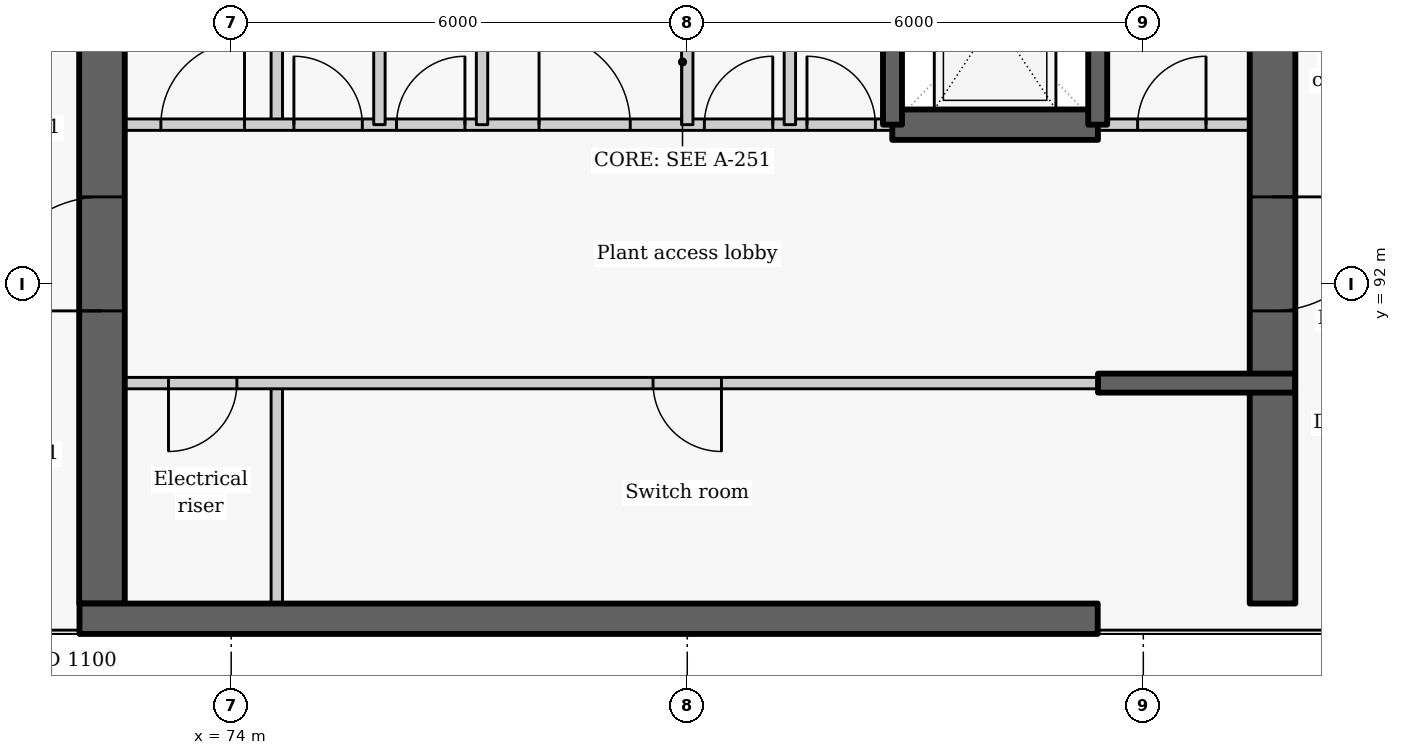
"""IFC4 building model, lengths in metres.
Left out: names, types, materials, properties, quantities, classifications, styles, units other than length and angle.
Written with IfcOpenShell. Run it as: python <this file> out.ifc"""

import sys

from ifc_helpers import new_model, si_unit, direction, frame, frame_2d, origin, place, context, subcontext, project, spatial, rectangle, extrude, element, fill, save


model = new_model("IFC4")
c1 = context("Model", 3, precision=1e-05, world=origin(), true_north=direction((0.0, 1.0)))
c2 = subcontext(c1, "Body", "Model", "MODEL_VIEW")
j1 = project(units=[si_unit("LENGTHUNIT", "METRE"), si_unit("PLANEANGLEUNIT", "RADIAN")], contexts=[c1])
p1 = place(None, origin())
s1 = spatial("IfcSite", under=j1, at=p1, CompositionType="ELEMENT")
p2 = place(p1, origin())
s2 = spatial("IfcBuilding", under=s1, at=p2, CompositionType="ELEMENT")
p3 = place(p2, frame((0.0, 0.0, 294.0)))
s3 = spatial("IfcBuildingStorey", under=s2, at=p3, CompositionType="ELEMENT", Elevation=294.0)
p4 = place(p3, frame((74.6, 87.8, 0.0), z_axis=(0.0, 0.0, 1.0), x_axis=(0.0, 1.0, 0.0)))
e1 = element("IfcWall", 1, at=p4, inside=s3, PredefinedType="PARTITIONING", context=c2, shape_type="SweptSolid", body=[
    extrude(rectangle(XDim=2.9, YDim=0.15, at=frame_2d((1.45, 0.0))), origin(), (0.0, 0.0, 1.0), 3.325),
])
p5 = place(p3, frame((74.6, 94.1, 0.0), z_axis=(0.0, 0.0, 1.0), x_axis=(0.0, 1.0, 0.0)))
e2 = element("IfcWall", 2, at=p5, inside=s3, PredefinedType="PARTITIONING", context=c2, shape_type="SweptSolid", body=[
    extrude(rectangle(XDim=2.8, YDim=0.15, at=frame_2d((1.4, 0.0))), origin(), (0.0, 0.0, 1.0), 3.325),
])
p6 = place(p3, frame((85.4, 90.7, 0.0), z_axis=(0.0, 0.0, 1.0), x_axis=(-1.0, 0.0, 0.0)))
e3 = element("IfcWall", 3, at=p6, inside=s3, PredefinedType="PARTITIONING", context=c2, shape_type="SweptSolid", body=[
    extrude(rectangle(XDim=13.4, YDim=0.15, at=frame_2d((6.7, 0.0))), origin(), (0.0, 0.0, 1.0), 3.325),
])
p7 = place(p6, frame((11.325, 0.0, 0.0)))
e4 = element("IfcOpeningElement", 4, at=p7, cuts=e3, PredefinedType="OPENING", context=c2, shape_type="SweptSolid", body=[
    extrude(rectangle(XDim=0.9, YDim=2.1, at=frame_2d((0.45, 1.05))), frame((0.0, 0.085, 0.0), z_axis=(0.0, -1.0, 0.0), x_axis=(1.0, 0.0, 0.0)), (0.0, 0.0, 1.0), 0.17),
])
p8 = place(p6, frame((4.95, 0.0, 0.0)))
e5 = element("IfcOpeningElement", 5, at=p8, cuts=e3, PredefinedType="OPENING", context=c2, shape_type="SweptSolid", body=[
    extrude(rectangle(XDim=0.9, YDim=2.1, at=frame_2d((0.45, 1.05))), frame((0.0, 0.085, 0.0), z_axis=(0.0, -1.0, 0.0), x_axis=(1.0, 0.0, 0.0)), (0.0, 0.0, 1.0), 0.17),
])
p9 = place(p3, frame((72.3, 87.8, -0.275), z_axis=(0.0, 0.0, 1.0), x_axis=(0.0, 1.0, 0.0)))
e6 = element("IfcWall", 6, at=p9, inside=s3, PredefinedType="SHEAR", context=c2, shape_type="SweptSolid", body=[
    extrude(rectangle(XDim=9.1, YDim=0.6, at=frame_2d((4.55, 0.0))), origin(), (0.0, 0.0, 1.0), 3.6),
])
p10 = place(p9, frame((3.85, 0.0, 0.275)))
e7 = element("IfcOpeningElement", 7, at=p10, cuts=e6, PredefinedType="OPENING", context=c2, shape_type="SweptSolid", body=[
    extrude(rectangle(XDim=1.5, YDim=2.1, at=frame_2d((0.75, 1.05))), frame((0.0, 0.31, 0.0), z_axis=(0.0, -1.0, 0.0), x_axis=(1.0, 0.0, 0.0)), (0.0, 0.0, 1.0), 0.62),
])
p11 = place(p3, frame((72.0, 94.1, 0.0), z_axis=(0.0, 0.0, 1.0), x_axis=(1.0, 0.0, 0.0)))
e8 = element("IfcWall", 8, at=p11, inside=s3, PredefinedType="PARTITIONING", context=c2, shape_type="SweptSolid", body=[
    extrude(rectangle(XDim=10.703, YDim=0.15, at=frame_2d((5.352, 0.0))), origin(), (0.0, 0.0, 1.0), 3.325),
])
p12 = place(p11, frame((1.075, 0.0, 0.0)))
e9 = element("IfcOpeningElement", 9, at=p12, cuts=e8, PredefinedType="OPENING", context=c2, shape_type="SweptSolid", body=[
    extrude(rectangle(XDim=1.1, YDim=2.1, at=frame_2d((0.55, 1.05))), frame((0.0, 0.085, 0.0), z_axis=(0.0, -1.0, 0.0), x_axis=(1.0, 0.0, 0.0)), (0.0, 0.0, 1.0), 0.17),
])
p13 = place(p11, frame((2.825, 0.0, 0.0)))
e10 = element("IfcOpeningElement", 10, at=p13, cuts=e8, PredefinedType="OPENING", context=c2, shape_type="SweptSolid", body=[
    extrude(rectangle(XDim=0.9, YDim=2.1, at=frame_2d((0.45, 1.05))), frame((0.0, 0.085, 0.0), z_axis=(0.0, -1.0, 0.0), x_axis=(1.0, 0.0, 0.0)), (0.0, 0.0, 1.0), 0.17),
])
p14 = place(p11, frame((4.175, 0.0, 0.0)))
e11 = element("IfcOpeningElement", 11, at=p14, cuts=e8, PredefinedType="OPENING", context=c2, shape_type="SweptSolid", body=[
    extrude(rectangle(XDim=0.9, YDim=2.1, at=frame_2d((0.45, 1.05))), frame((0.0, 0.085, 0.0), z_axis=(0.0, -1.0, 0.0), x_axis=(1.0, 0.0, 0.0)), (0.0, 0.0, 1.0), 0.17),
])
p15 = place(p11, frame((6.05, 0.0, 0.0)))
e12 = element("IfcOpeningElement", 12, at=p15, cuts=e8, PredefinedType="OPENING", context=c2, shape_type="SweptSolid", body=[
    extrude(rectangle(XDim=1.2, YDim=2.1, at=frame_2d((0.6, 1.05))), frame((0.0, 0.085, 0.0), z_axis=(0.0, -1.0, 0.0), x_axis=(1.0, 0.0, 0.0)), (0.0, 0.0, 1.0), 0.17),
])
p16 = place(p11, frame((8.225, 0.0, 0.0)))
e13 = element("IfcOpeningElement", 13, at=p16, cuts=e8, PredefinedType="OPENING", context=c2, shape_type="SweptSolid", body=[
    extrude(rectangle(XDim=0.9, YDim=2.1, at=frame_2d((0.45, 1.05))), frame((0.0, 0.085, 0.0), z_axis=(0.0, -1.0, 0.0), x_axis=(1.0, 0.0, 0.0)), (0.0, 0.0, 1.0), 0.17),
])
p17 = place(p11, frame((9.575, 0.0, 0.0)))
e14 = element("IfcOpeningElement", 14, at=p17, cuts=e8, PredefinedType="OPENING", context=c2, shape_type="SweptSolid", body=[
    extrude(rectangle(XDim=0.9, YDim=2.1, at=frame_2d((0.45, 1.05))), frame((0.0, 0.085, 0.0), z_axis=(0.0, -1.0, 0.0), x_axis=(1.0, 0.0, 0.0)), (0.0, 0.0, 1.0), 0.17),
])
p18 = place(p3, frame((85.397, 94.1, 0.0), z_axis=(0.0, 0.0, 1.0), x_axis=(1.0, 0.0, 0.0)))
e15 = element("IfcWall", 15, at=p18, inside=s3, PredefinedType="PARTITIONING", context=c2, shape_type="SweptSolid", body=[
    extrude(rectangle(XDim=2.603, YDim=0.15, at=frame_2d((1.302, 0.0))), origin(), (0.0, 0.0, 1.0), 3.325),
])
p19 = place(p18, frame((0.528, 0.0, 0.0)))
e16 = element("IfcOpeningElement", 16, at=p19, cuts=e15, PredefinedType="OPENING", context=c2, shape_type="SweptSolid", body=[
    extrude(rectangle(XDim=0.9, YDim=2.1, at=frame_2d((0.45, 1.05))), frame((0.0, 0.085, 0.0), z_axis=(0.0, -1.0, 0.0), x_axis=(1.0, 0.0, 0.0)), (0.0, 0.0, 1.0), 0.17),
])
p20 = place(p3, frame((82.697, 94.1, -0.275), z_axis=(0.0, 0.0, 1.0), x_axis=(1.0, 0.0, 0.0)))
e17 = element("IfcWall", 17, at=p20, inside=s3, PredefinedType="SHEAR", context=c2, shape_type="SweptSolid", body=[
    extrude(rectangle(XDim=2.706, YDim=0.4, at=frame_2d((1.353, 0.0))), origin(), (0.0, 0.0, 1.0), 3.6),
])
p21 = place(p3, frame((87.7, 102.05, -0.275), z_axis=(0.0, 0.0, 1.0), x_axis=(0.0, -1.0, 0.0)))
e18 = element("IfcWall", 18, at=p21, inside=s3, PredefinedType="SHEAR", context=c2, shape_type="SweptSolid", body=[
    extrude(rectangle(XDim=11.35, YDim=0.6, at=frame_2d((5.675, 0.0))), origin(), (0.0, 0.0, 1.0), 3.6),
])
p22 = place(p21, frame((8.9, 0.0, 0.275)))
e19 = element("IfcOpeningElement", 19, at=p22, cuts=e18, PredefinedType="OPENING", context=c2, shape_type="SweptSolid", body=[
    extrude(rectangle(XDim=1.5, YDim=2.1, at=frame_2d((0.75, 1.05))), frame((0.0, 0.31, 0.0), z_axis=(0.0, -1.0, 0.0), x_axis=(1.0, 0.0, 0.0)), (0.0, 0.0, 1.0), 0.62),
])
p23 = place(p21, frame((2.025, 0.0, 0.275)))
e20 = element("IfcOpeningElement", 20, at=p23, cuts=e18, PredefinedType="OPENING", context=c2, shape_type="SweptSolid", body=[
    extrude(rectangle(XDim=1.1, YDim=2.1, at=frame_2d((0.55, 1.05))), frame((0.0, 0.31, 0.0), z_axis=(0.0, -1.0, 0.0), x_axis=(1.0, 0.0, 0.0)), (0.0, 0.0, 1.0), 0.62),
])
for number, where, z_axis, x_axis in (
    (21, (75.95, 94.1, 0.0), (0.0, 0.0, 1.0), (0.0, 1.0, 0.0)),
    (22, (77.3, 94.1, 0.0), (0.0, 0.0, 1.0), (0.0, 1.0, 0.0)),
    (23, (80.0, 94.1, 0.0), (0.0, 0.0, 1.0), (0.0, 1.0, 0.0)),
    (24, (81.35, 94.1, 0.0), (0.0, 0.0, 1.0), (0.0, 1.0, 0.0)),
):
    element("IfcWall", number, at=place(p3, frame(where, z_axis=z_axis, x_axis=x_axis)), inside=s3, PredefinedType="PARTITIONING", context=c2, shape_type="SweptSolid", body=[
        extrude(rectangle(XDim=2.8, YDim=0.15, at=frame_2d((1.4, 0.0))), origin(), (0.0, 0.0, 1.0), 3.325),
    ])
for number, where, z_axis, x_axis in (
    (25, (82.7, 94.1, -0.275), (0.0, 0.0, 1.0), (0.0, 1.0, 0.0)),
    (26, (85.4, 94.1, -0.275), (0.0, 0.0, 1.0), (0.0, 1.0, 0.0)),
):
    element("IfcWall", number, at=place(p3, frame(where, z_axis=z_axis, x_axis=x_axis)), inside=s3, PredefinedType="SHEAR", context=c2, shape_type="SweptSolid", body=[
        extrude(rectangle(XDim=2.8, YDim=0.25, at=frame_2d((1.4, 0.0))), origin(), (0.0, 0.0, 1.0), 3.6),
    ])
p24 = place(p3, frame((72.004, 87.6, -0.275), z_axis=(0.0, 0.0, 1.0), x_axis=(1.0, 0.0, 0.0)))
e27 = element("IfcWall", 27, at=p24, inside=s3, PredefinedType="SHEAR", context=c2, shape_type="SweptSolid", body=[
    extrude(rectangle(XDim=13.396, YDim=0.4, at=frame_2d((6.698, 0.0))), origin(), (0.0, 0.0, 1.0), 3.6),
])
p25 = place(p3, frame((87.7, 87.8, -0.275), z_axis=(0.0, 0.0, 1.0), x_axis=(0.0, 1.0, 0.0)))
e28 = element("IfcWall", 28, at=p25, inside=s3, PredefinedType="SHEAR", context=c2, shape_type="SweptSolid", body=[
    extrude(rectangle(XDim=2.896, YDim=0.6, at=frame_2d((1.448, 0.0))), origin(), (0.0, 0.0, 1.0), 3.6),
])
p26 = place(p3, frame((85.404, 90.7, -0.275), z_axis=(0.0, 0.0, 1.0), x_axis=(1.0, 0.0, 0.0)))
e29 = element("IfcWall", 29, at=p26, inside=s3, PredefinedType="SHEAR", context=c2, shape_type="SweptSolid", body=[
    extrude(rectangle(XDim=2.592, YDim=0.25, at=frame_2d((1.296, 0.0))), origin(), (0.0, 0.0, 1.0), 3.6),
])
p27 = place(p7, origin())
e30 = element("IfcDoor", 30, at=p27, inside=s3, OperationType="SINGLE_SWING_RIGHT", PredefinedType="DOOR", context=c2, shape_type="SweptSolid", body=[
    extrude(rectangle(XDim=0.9, YDim=2.1, at=frame_2d((0.45, 1.05))), frame((0.0, 0.025, 0.0), z_axis=(0.0, -1.0, 0.0), x_axis=(1.0, 0.0, 0.0)), (0.0, 0.0, 1.0), 0.05),
])
fill(e4, e30)
p28 = place(p8, origin())
e31 = element("IfcDoor", 31, at=p28, inside=s3, OperationType="SINGLE_SWING_LEFT", PredefinedType="DOOR", context=c2, shape_type="SweptSolid", body=[
    extrude(rectangle(XDim=0.9, YDim=2.1, at=frame_2d((0.45, 1.05))), frame((0.0, 0.025, 0.0), z_axis=(0.0, -1.0, 0.0), x_axis=(1.0, 0.0, 0.0)), (0.0, 0.0, 1.0), 0.05),
])
fill(e5, e31)
p29 = place(p12, origin())
e32 = element("IfcDoor", 32, at=p29, inside=s3, OperationType="SINGLE_SWING_RIGHT", PredefinedType="DOOR", context=c2, shape_type="SweptSolid", body=[
    extrude(rectangle(XDim=1.1, YDim=2.1, at=frame_2d((0.55, 1.05))), frame((0.0, 0.025, 0.0), z_axis=(0.0, -1.0, 0.0), x_axis=(1.0, 0.0, 0.0)), (0.0, 0.0, 1.0), 0.05),
])
fill(e9, e32)
p30 = place(p13, origin())
e33 = element("IfcDoor", 33, at=p30, inside=s3, OperationType="SINGLE_SWING_LEFT", PredefinedType="DOOR", context=c2, shape_type="SweptSolid", body=[
    extrude(rectangle(XDim=0.9, YDim=2.1, at=frame_2d((0.45, 1.05))), frame((0.0, 0.025, 0.0), z_axis=(0.0, -1.0, 0.0), x_axis=(1.0, 0.0, 0.0)), (0.0, 0.0, 1.0), 0.05),
])
fill(e10, e33)
p31 = place(p14, origin())
e34 = element("IfcDoor", 34, at=p31, inside=s3, OperationType="SINGLE_SWING_RIGHT", PredefinedType="DOOR", context=c2, shape_type="SweptSolid", body=[
    extrude(rectangle(XDim=0.9, YDim=2.1, at=frame_2d((0.45, 1.05))), frame((0.0, 0.025, 0.0), z_axis=(0.0, -1.0, 0.0), x_axis=(1.0, 0.0, 0.0)), (0.0, 0.0, 1.0), 0.05),
])
fill(e11, e34)
p32 = place(p15, origin())
e35 = element("IfcDoor", 35, at=p32, inside=s3, OperationType="DOUBLE_DOOR_SINGLE_SWING", PredefinedType="DOOR", context=c2, shape_type="SweptSolid", body=[
    extrude(rectangle(XDim=1.2, YDim=2.1, at=frame_2d((0.6, 1.05))), frame((0.0, 0.025, 0.0), z_axis=(0.0, -1.0, 0.0), x_axis=(1.0, 0.0, 0.0)), (0.0, 0.0, 1.0), 0.05),
])
fill(e12, e35)
p33 = place(p16, origin())
e36 = element("IfcDoor", 36, at=p33, inside=s3, OperationType="SINGLE_SWING_RIGHT", PredefinedType="DOOR", context=c2, shape_type="SweptSolid", body=[
    extrude(rectangle(XDim=0.9, YDim=2.1, at=frame_2d((0.45, 1.05))), frame((0.0, 0.025, 0.0), z_axis=(0.0, -1.0, 0.0), x_axis=(1.0, 0.0, 0.0)), (0.0, 0.0, 1.0), 0.05),
])
fill(e13, e36)
p34 = place(p17, origin())
e37 = element("IfcDoor", 37, at=p34, inside=s3, OperationType="SINGLE_SWING_LEFT", PredefinedType="DOOR", context=c2, shape_type="SweptSolid", body=[
    extrude(rectangle(XDim=0.9, YDim=2.1, at=frame_2d((0.45, 1.05))), frame((0.0, 0.025, 0.0), z_axis=(0.0, -1.0, 0.0), x_axis=(1.0, 0.0, 0.0)), (0.0, 0.0, 1.0), 0.05),
])
fill(e14, e37)
p35 = place(p19, origin())
e38 = element("IfcDoor", 38, at=p35, inside=s3, OperationType="SINGLE_SWING_RIGHT", PredefinedType="DOOR", context=c2, shape_type="SweptSolid", body=[
    extrude(rectangle(XDim=0.9, YDim=2.1, at=frame_2d((0.45, 1.05))), frame((0.0, 0.025, 0.0), z_axis=(0.0, -1.0, 0.0), x_axis=(1.0, 0.0, 0.0)), (0.0, 0.0, 1.0), 0.05),
])
fill(e16, e38)
p36 = place(p22, origin())
e39 = element("IfcDoor", 39, at=p36, inside=s3, OperationType="DOUBLE_DOOR_SINGLE_SWING", PredefinedType="DOOR", context=c2, shape_type="SweptSolid", body=[
    extrude(rectangle(XDim=1.5, YDim=2.1, at=frame_2d((0.75, 1.05))), frame((0.0, 0.025, 0.0), z_axis=(0.0, -1.0, 0.0), x_axis=(1.0, 0.0, 0.0)), (0.0, 0.0, 1.0), 0.05),
])
fill(e19, e39)
p37 = place(p10, origin())
e40 = element("IfcDoor", 40, at=p37, inside=s3, OperationType="DOUBLE_DOOR_SINGLE_SWING", PredefinedType="DOOR", context=c2, shape_type="SweptSolid", body=[
    extrude(rectangle(XDim=1.5, YDim=2.1, at=frame_2d((0.75, 1.05))), frame((0.0, 0.025, 0.0), z_axis=(0.0, -1.0, 0.0), x_axis=(1.0, 0.0, 0.0)), (0.0, 0.0, 1.0), 0.05),
])
fill(e7, e40)
save(model, sys.argv[1])
